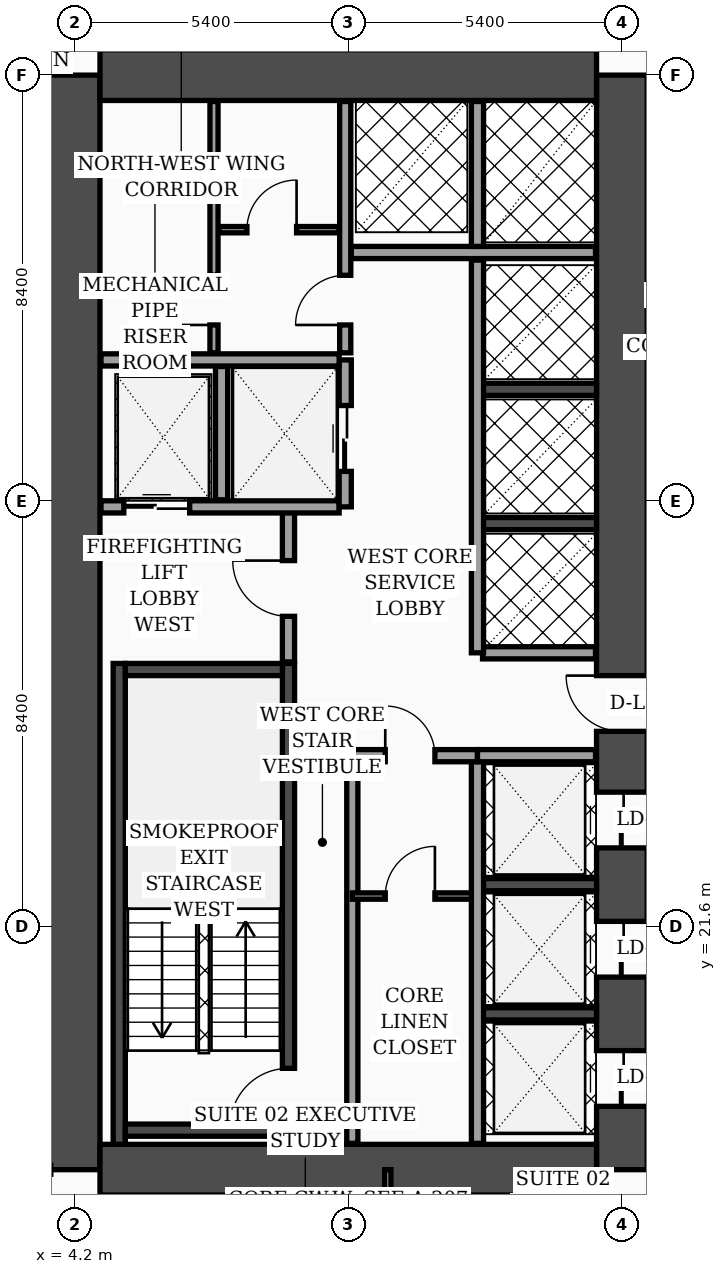
"""IFC4 building model, lengths in metres.
Left out: names, types, materials, properties, quantities, classifications, styles, units other than length and angle.
Written with IfcOpenShell. Run it as: python <this file> out.ifc"""

import sys

from ifc_helpers import new_model, si_unit, direction, frame, frame_2d, origin, place, context, subcontext, project, spatial, rectangle, extrude, element, fill, save


model = new_model("IFC4")
c1 = context("Model", 3, precision=1e-05, world=origin(), true_north=direction((0.0, 1.0)))
c2 = subcontext(c1, "Body", "Model", "MODEL_VIEW")
j1 = project(units=[si_unit("LENGTHUNIT", "METRE"), si_unit("PLANEANGLEUNIT", "RADIAN")], contexts=[c1])
p1 = place(None, origin())
s1 = spatial("IfcSite", under=j1, at=p1, CompositionType="ELEMENT")
p2 = place(p1, origin())
s2 = spatial("IfcBuilding", under=s1, at=p2, CompositionType="ELEMENT")
p3 = place(p2, frame((0.0, 0.0, 27.0)))
s3 = spatial("IfcBuildingStorey", under=s2, at=p3, CompositionType="ELEMENT", Elevation=27.0)
p4 = place(p3, frame((4.2, 16.8, 0.0), z_axis=(0.0, 0.0, 1.0), x_axis=(0.0, 1.0, 0.0)))
e1 = element("IfcWall", 1, at=p4, inside=s3, PredefinedType="SHEAR", context=c2, shape_type="SweptSolid", body=[
    extrude(rectangle(XDim=21.6, YDim=1.0, at=frame_2d((10.8, 0.0))), origin(), (0.0, 0.0, 1.0), 3.56),
])
p5 = place(p3, frame((15.0, 16.8, 0.0), z_axis=(0.0, 0.0, 1.0), x_axis=(0.0, 1.0, 0.0)))
e2 = element("IfcWall", 2, at=p5, inside=s3, PredefinedType="SHEAR", context=c2, shape_type="SweptSolid", body=[
    extrude(rectangle(XDim=21.6, YDim=1.0, at=frame_2d((10.8, 0.0))), origin(), (0.0, 0.0, 1.0), 3.56),
])
p6 = place(p5, frame((8.65, 0.0, 0.0)))
e3 = element("IfcOpeningElement", 3, at=p6, cuts=e2, PredefinedType="OPENING", context=c2, shape_type="SweptSolid", body=[
    extrude(rectangle(XDim=1.1, YDim=2.2, at=frame_2d((0.55, 1.1))), frame((0.0, 0.51, 0.0), z_axis=(0.0, -1.0, 0.0), x_axis=(1.0, 0.0, 0.0)), (0.0, 0.0, 1.0), 1.02),
])
p7 = place(p5, frame((1.25, 0.0, 0.0)))
e4 = element("IfcOpeningElement", 4, at=p7, cuts=e2, PredefinedType="OPENING", context=c2, shape_type="SweptSolid", body=[
    extrude(rectangle(XDim=1.1, YDim=2.2, at=frame_2d((0.55, 1.1))), frame((0.0, 0.51, 0.0), z_axis=(0.0, -1.0, 0.0), x_axis=(1.0, 0.0, 0.0)), (0.0, 0.0, 1.0), 1.02),
])
p8 = place(p5, frame((3.8, 0.0, 0.0)))
e5 = element("IfcOpeningElement", 5, at=p8, cuts=e2, PredefinedType="OPENING", context=c2, shape_type="SweptSolid", body=[
    extrude(rectangle(XDim=1.1, YDim=2.2, at=frame_2d((0.55, 1.1))), frame((0.0, 0.51, 0.0), z_axis=(0.0, -1.0, 0.0), x_axis=(1.0, 0.0, 0.0)), (0.0, 0.0, 1.0), 1.02),
])
p9 = place(p5, frame((6.35, 0.0, 0.0)))
e6 = element("IfcOpeningElement", 6, at=p9, cuts=e2, PredefinedType="OPENING", context=c2, shape_type="SweptSolid", body=[
    extrude(rectangle(XDim=1.1, YDim=2.2, at=frame_2d((0.55, 1.1))), frame((0.0, 0.51, 0.0), z_axis=(0.0, -1.0, 0.0), x_axis=(1.0, 0.0, 0.0)), (0.0, 0.0, 1.0), 1.02),
])
for number, where, z_axis, x_axis in (
    (7, (4.7, 38.4, 0.0), (0.0, 0.0, 1.0), (1.0, 0.0, 0.0)),
    (8, (4.7, 16.8, 0.0), (0.0, 0.0, 1.0), (1.0, 0.0, 0.0)),
):
    element("IfcWall", number, at=place(p3, frame(where, z_axis=z_axis, x_axis=x_axis)), inside=s3, PredefinedType="SHEAR", context=c2, shape_type="SweptSolid", body=[
        extrude(rectangle(XDim=9.8, YDim=1.0, at=frame_2d((4.9, 0.0))), origin(), (0.0, 0.0, 1.0), 3.56),
    ])
p10 = place(p3, frame((5.08, 17.3, 0.0), z_axis=(0.0, 0.0, 1.0), x_axis=(0.0, 1.0, 0.0)))
e9 = element("IfcWall", 9, at=p10, inside=s3, PredefinedType="SOLIDWALL", context=c2, shape_type="SweptSolid", body=[
    extrude(rectangle(XDim=9.49, YDim=0.24, at=frame_2d((4.745, 0.0))), origin(), (0.0, 0.0, 1.0), 3.56),
])
p11 = place(p3, frame((8.42, 17.3, 0.0), z_axis=(0.0, 0.0, 1.0), x_axis=(0.0, 1.0, 0.0)))
e10 = element("IfcWall", 10, at=p11, inside=s3, PredefinedType="SOLIDWALL", context=c2, shape_type="SweptSolid", body=[
    extrude(rectangle(XDim=9.49, YDim=0.24, at=frame_2d((4.745, 0.0))), origin(), (0.0, 0.0, 1.0), 3.56),
])
p12 = place(p11, frame((0.35, 0.0, 0.0)))
e11 = element("IfcOpeningElement", 11, at=p12, cuts=e10, PredefinedType="OPENING", context=c2, shape_type="SweptSolid", body=[
    extrude(rectangle(XDim=1.15, YDim=2.2, at=frame_2d((0.575, 1.1))), frame((0.0, 0.13, 0.0), z_axis=(0.0, -1.0, 0.0), x_axis=(1.0, 0.0, 0.0)), (0.0, 0.0, 1.0), 0.26),
])
for number, where, z_axis, x_axis in (
    (12, (5.2, 17.58, 0.0), (0.0, 0.0, 1.0), (1.0, 0.0, 0.0)),
    (13, (5.2, 26.67, 0.0), (0.0, 0.0, 1.0), (1.0, 0.0, 0.0)),
):
    element("IfcWall", number, at=place(p3, frame(where, z_axis=z_axis, x_axis=x_axis)), inside=s3, PredefinedType="SOLIDWALL", context=c2, shape_type="SweptSolid", body=[
        extrude(rectangle(XDim=3.1, YDim=0.24, at=frame_2d((1.55, 0.0))), origin(), (0.0, 0.0, 1.0), 3.56),
    ])
for number, where, z_axis, x_axis in (
    (14, (12.18, 19.875, 0.0), (0.0, 0.0, 1.0), (1.0, 0.0, 0.0)),
    (15, (12.18, 22.425, 0.0), (0.0, 0.0, 1.0), (1.0, 0.0, 0.0)),
    (16, (12.18, 29.55, 0.0), (0.0, 0.0, 1.0), (1.0, 0.0, 0.0)),
    (17, (12.18, 32.2, 0.0), (0.0, 0.0, 1.0), (1.0, 0.0, 0.0)),
):
    element("IfcWall", number, at=place(p3, frame(where, z_axis=z_axis, x_axis=x_axis)), inside=s3, PredefinedType="SOLIDWALL", context=c2, shape_type="SweptSolid", body=[
        extrude(rectangle(XDim=2.32, YDim=0.24, at=frame_2d((1.16, 0.0))), origin(), (0.0, 0.0, 1.0), 3.56),
    ])
p13 = place(p3, frame((8.42, 26.82, 0.0), z_axis=(0.0, 0.0, 1.0), x_axis=(0.0, 1.0, 0.0)))
e18 = element("IfcWall", 18, at=p13, inside=s3, PredefinedType="SOLIDWALL", context=c2, shape_type="SweptSolid", body=[
    extrude(rectangle(XDim=3.0, YDim=0.24, at=frame_2d((1.5, 0.0))), origin(), (0.0, 0.0, 1.0), 3.56),
])
p14 = place(p13, frame((0.9, 0.0, 0.0)))
e19 = element("IfcOpeningElement", 19, at=p14, cuts=e18, PredefinedType="OPENING", context=c2, shape_type="SweptSolid", body=[
    extrude(rectangle(XDim=1.1, YDim=2.2, at=frame_2d((0.55, 1.1))), frame((0.0, 0.13, 0.0), z_axis=(0.0, -1.0, 0.0), x_axis=(1.0, 0.0, 0.0)), (0.0, 0.0, 1.0), 0.26),
])
p15 = place(p3, frame((4.72, 29.88, 0.0), z_axis=(0.0, 0.0, 1.0), x_axis=(1.0, 0.0, 0.0)))
e20 = element("IfcWall", 20, at=p15, inside=s3, PredefinedType="SOLIDWALL", context=c2, shape_type="SweptSolid", body=[
    extrude(rectangle(XDim=4.7, YDim=0.24, at=frame_2d((2.35, 0.0))), origin(), (0.0, 0.0, 1.0), 3.56),
])
p16 = place(p15, frame((0.45, 0.0, 0.0)))
e21 = element("IfcOpeningElement", 21, at=p16, cuts=e20, PredefinedType="OPENING", context=c2, shape_type="SweptSolid", body=[
    extrude(rectangle(XDim=1.3, YDim=2.35, at=frame_2d((0.65, 1.175))), frame((0.0, 0.13, 0.0), z_axis=(0.0, -1.0, 0.0), x_axis=(1.0, 0.0, 0.0)), (0.0, 0.0, 1.0), 0.26),
])
p17 = place(p3, frame((7.1, 30.02, 0.0), z_axis=(0.0, 0.0, 1.0), x_axis=(0.0, 1.0, 0.0)))
e22 = element("IfcWall", 22, at=p17, inside=s3, PredefinedType="SOLIDWALL", context=c2, shape_type="SweptSolid", body=[
    extrude(rectangle(XDim=2.63, YDim=0.24, at=frame_2d((1.315, 0.0))), origin(), (0.0, 0.0, 1.0), 3.56),
])
p18 = place(p3, frame((9.54, 29.88, 0.0), z_axis=(0.0, 0.0, 1.0), x_axis=(0.0, 1.0, 0.0)))
e23 = element("IfcWall", 23, at=p18, inside=s3, PredefinedType="SOLIDWALL", context=c2, shape_type="SweptSolid", body=[
    extrude(rectangle(XDim=2.9, YDim=0.24, at=frame_2d((1.45, 0.0))), origin(), (0.0, 0.0, 1.0), 3.56),
])
p19 = place(p18, frame((0.7, 0.0, 0.0)))
e24 = element("IfcOpeningElement", 24, at=p19, cuts=e23, PredefinedType="OPENING", context=c2, shape_type="SweptSolid", body=[
    extrude(rectangle(XDim=1.3, YDim=2.35, at=frame_2d((0.65, 1.175))), frame((0.0, 0.13, 0.0), z_axis=(0.0, -1.0, 0.0), x_axis=(1.0, 0.0, 0.0)), (0.0, 0.0, 1.0), 0.26),
])
p20 = place(p3, frame((4.72, 32.78, 0.0), z_axis=(0.0, 0.0, 1.0), x_axis=(1.0, 0.0, 0.0)))
e25 = element("IfcWall", 25, at=p20, inside=s3, PredefinedType="SOLIDWALL", context=c2, shape_type="SweptSolid", body=[
    extrude(rectangle(XDim=4.7, YDim=0.24, at=frame_2d((2.35, 0.0))), origin(), (0.0, 0.0, 1.0), 3.56),
])
p21 = place(p3, frame((9.68, 17.32, 0.0), z_axis=(0.0, 0.0, 1.0), x_axis=(0.0, 1.0, 0.0)))
e26 = element("IfcWall", 26, at=p21, inside=s3, PredefinedType="SOLIDWALL", context=c2, shape_type="SweptSolid", body=[
    extrude(rectangle(XDim=7.68, YDim=0.22, at=frame_2d((3.84, 0.0))), origin(), (0.0, 0.0, 1.0), 3.56),
])
p22 = place(p3, frame((6.95, 32.92, 0.0), z_axis=(0.0, 0.0, 1.0), x_axis=(0.0, 1.0, 0.0)))
e27 = element("IfcWall", 27, at=p22, inside=s3, PredefinedType="PARTITIONING", context=c2, shape_type="SweptSolid", body=[
    extrude(rectangle(XDim=4.96, YDim=0.16, at=frame_2d((2.48, 0.0))), origin(), (0.0, 0.0, 1.0), 3.56),
])
p23 = place(p22, frame((0.55, 0.0, 0.0)))
e28 = element("IfcOpeningElement", 28, at=p23, cuts=e27, PredefinedType="OPENING", context=c2, shape_type="SweptSolid", body=[
    extrude(rectangle(XDim=0.98, YDim=2.15, at=frame_2d((0.49, 1.075))), frame((0.0, 0.09, 0.0), z_axis=(0.0, -1.0, 0.0), x_axis=(1.0, 0.0, 0.0)), (0.0, 0.0, 1.0), 0.18),
])
p24 = place(p3, frame((7.05, 35.35, 0.0), z_axis=(0.0, 0.0, 1.0), x_axis=(1.0, 0.0, 0.0)))
e29 = element("IfcWall", 29, at=p24, inside=s3, PredefinedType="PARTITIONING", context=c2, shape_type="SweptSolid", body=[
    extrude(rectangle(XDim=2.37, YDim=0.125, at=frame_2d((1.185, 0.0))), origin(), (0.0, 0.0, 1.0), 3.56),
])
p25 = place(p24, frame((0.55, 0.0, 0.0)))
e30 = element("IfcOpeningElement", 30, at=p25, cuts=e29, PredefinedType="OPENING", context=c2, shape_type="SweptSolid", body=[
    extrude(rectangle(XDim=0.98, YDim=2.15, at=frame_2d((0.49, 1.075))), frame((0.0, 0.073, 0.0), z_axis=(0.0, -1.0, 0.0), x_axis=(1.0, 0.0, 0.0)), (0.0, 0.0, 1.0), 0.145),
])
p26 = place(p3, frame((9.54, 32.92, 0.0), z_axis=(0.0, 0.0, 1.0), x_axis=(0.0, 1.0, 0.0)))
e31 = element("IfcWall", 31, at=p26, inside=s3, PredefinedType="SOLIDWALL", context=c2, shape_type="SweptSolid", body=[
    extrude(rectangle(XDim=4.96, YDim=0.22, at=frame_2d((2.48, 0.0))), origin(), (0.0, 0.0, 1.0), 3.56),
])
p27 = place(p26, frame((0.55, 0.0, 0.0)))
e32 = element("IfcOpeningElement", 32, at=p27, cuts=e31, PredefinedType="OPENING", context=c2, shape_type="SweptSolid", body=[
    extrude(rectangle(XDim=0.98, YDim=2.15, at=frame_2d((0.49, 1.075))), frame((0.0, 0.12, 0.0), z_axis=(0.0, -1.0, 0.0), x_axis=(1.0, 0.0, 0.0)), (0.0, 0.0, 1.0), 0.24),
])
p28 = place(p3, frame((9.68, 22.2, 0.0), z_axis=(0.0, 0.0, 1.0), x_axis=(1.0, 0.0, 0.0)))
e33 = element("IfcWall", 33, at=p28, inside=s3, PredefinedType="PARTITIONING", context=c2, shape_type="SweptSolid", body=[
    extrude(rectangle(XDim=2.47, YDim=0.125, at=frame_2d((1.235, 0.0))), origin(), (0.0, 0.0, 1.0), 3.56),
])
p29 = place(p28, frame((0.65, 0.0, 0.0)))
e34 = element("IfcOpeningElement", 34, at=p29, cuts=e33, PredefinedType="OPENING", context=c2, shape_type="SweptSolid", body=[
    extrude(rectangle(XDim=0.98, YDim=2.15, at=frame_2d((0.49, 1.075))), frame((0.0, 0.073, 0.0), z_axis=(0.0, -1.0, 0.0), x_axis=(1.0, 0.0, 0.0)), (0.0, 0.0, 1.0), 0.145),
])
p30 = place(p3, frame((12.15, 17.32, 0.0), z_axis=(0.0, 0.0, 1.0), x_axis=(0.0, 1.0, 0.0)))
e35 = element("IfcWall", 35, at=p30, inside=s3, PredefinedType="SOLIDWALL", context=c2, shape_type="SweptSolid", body=[
    extrude(rectangle(XDim=7.65, YDim=0.24, at=frame_2d((3.825, 0.0))), origin(), (0.0, 0.0, 1.0), 3.56),
])
p31 = place(p3, frame((9.68, 24.97, 0.0), z_axis=(0.0, 0.0, 1.0), x_axis=(1.0, 0.0, 0.0)))
e36 = element("IfcWall", 36, at=p31, inside=s3, PredefinedType="SOLIDWALL", context=c2, shape_type="SweptSolid", body=[
    extrude(rectangle(XDim=2.47, YDim=0.24, at=frame_2d((1.235, 0.0))), origin(), (0.0, 0.0, 1.0), 3.56),
])
p32 = place(p31, frame((0.65, 0.0, 0.0)))
e37 = element("IfcOpeningElement", 37, at=p32, cuts=e36, PredefinedType="OPENING", context=c2, shape_type="SweptSolid", body=[
    extrude(rectangle(XDim=0.98, YDim=2.15, at=frame_2d((0.49, 1.075))), frame((0.0, 0.13, 0.0), z_axis=(0.0, -1.0, 0.0), x_axis=(1.0, 0.0, 0.0)), (0.0, 0.0, 1.0), 0.26),
])
p33 = place(p3, frame((12.15, 24.97, 0.0), z_axis=(0.0, 0.0, 1.0), x_axis=(1.0, 0.0, 0.0)))
e38 = element("IfcWall", 38, at=p33, inside=s3, PredefinedType="SOLIDWALL", context=c2, shape_type="SweptSolid", body=[
    extrude(rectangle(XDim=2.33, YDim=0.24, at=frame_2d((1.165, 0.0))), origin(), (0.0, 0.0, 1.0), 2.84),
])
p34 = place(p3, frame((12.25, 27.0, 0.0), z_axis=(0.0, 0.0, 1.0), x_axis=(1.0, 0.0, 0.0)))
e39 = element("IfcWall", 39, at=p34, inside=s3, PredefinedType="SOLIDWALL", context=c2, shape_type="SweptSolid", body=[
    extrude(rectangle(XDim=2.23, YDim=0.24, at=frame_2d((1.115, 0.0))), origin(), (0.0, 0.0, 1.0), 3.56),
])
p35 = place(p3, frame((12.15, 27.0, 0.0), z_axis=(0.0, 0.0, 1.0), x_axis=(0.0, 1.0, 0.0)))
e40 = element("IfcWall", 40, at=p35, inside=s3, PredefinedType="SOLIDWALL", context=c2, shape_type="SweptSolid", body=[
    extrude(rectangle(XDim=7.75, YDim=0.24, at=frame_2d((3.875, 0.0))), origin(), (0.0, 0.0, 1.0), 3.56),
])
p36 = place(p3, frame((9.66, 34.9, 0.0), z_axis=(0.0, 0.0, 1.0), x_axis=(1.0, 0.0, 0.0)))
e41 = element("IfcWall", 41, at=p36, inside=s3, PredefinedType="SOLIDWALL", context=c2, shape_type="SweptSolid", body=[
    extrude(rectangle(XDim=4.82, YDim=0.24, at=frame_2d((2.41, 0.0))), origin(), (0.0, 0.0, 1.0), 3.56),
])
p37 = place(p3, frame((12.15, 35.02, 0.0), z_axis=(0.0, 0.0, 1.0), x_axis=(0.0, 1.0, 0.0)))
e42 = element("IfcWall", 42, at=p37, inside=s3, PredefinedType="SOLIDWALL", context=c2, shape_type="SweptSolid", body=[
    extrude(rectangle(XDim=2.86, YDim=0.24, at=frame_2d((1.43, 0.0))), origin(), (0.0, 0.0, 1.0), 3.56),
])
p38 = place(p3, frame((10.38, 14.67, 0.0), z_axis=(0.0, 0.0, 1.0), x_axis=(0.0, 1.0, 0.0)))
e43 = element("IfcWall", 43, at=p38, inside=s3, PredefinedType="PARTITIONING", context=c2, shape_type="SweptSolid", body=[
    extrude(rectangle(XDim=2.13, YDim=0.125, at=frame_2d((1.065, 0.0))), origin(), (0.0, 0.0, 1.0), 3.56),
])
p39 = place(p3, frame((13.3, 2.44, 0.0), z_axis=(0.0, 0.0, 1.0), x_axis=(0.0, 1.0, 0.0)))
e44 = element("IfcWall", 44, at=p39, inside=s3, PredefinedType="PARTITIONING", context=c2, shape_type="SweptSolid", body=[
    extrude(rectangle(XDim=14.36, YDim=0.18, at=frame_2d((7.18, 0.0))), origin(), (0.0, 0.0, 1.0), 3.04),
])
p40 = place(p39, frame((3.01, 0.0, 0.0)))
e45 = element("IfcOpeningElement", 45, at=p40, cuts=e44, PredefinedType="OPENING", context=c2, shape_type="SweptSolid", body=[
    extrude(rectangle(XDim=1.02, YDim=2.2, at=frame_2d((0.51, 1.1))), frame((0.0, 0.1, 0.0), z_axis=(0.0, -1.0, 0.0), x_axis=(1.0, 0.0, 0.0)), (0.0, 0.0, 1.0), 0.2),
])
p41 = place(p39, frame((8.94, 0.0, 0.0)))
e46 = element("IfcOpeningElement", 46, at=p41, cuts=e44, PredefinedType="OPENING", context=c2, shape_type="SweptSolid", body=[
    extrude(rectangle(XDim=1.02, YDim=2.2, at=frame_2d((0.51, 1.1))), frame((0.0, 0.1, 0.0), z_axis=(0.0, -1.0, 0.0), x_axis=(1.0, 0.0, 0.0)), (0.0, 0.0, 1.0), 0.2),
])
p42 = place(p14, origin())
e47 = element("IfcDoor", 47, at=p42, inside=s3, OperationType="SINGLE_SWING_RIGHT", PredefinedType="DOOR", context=c2, shape_type="SweptSolid", body=[
    extrude(rectangle(XDim=1.1, YDim=2.2, at=frame_2d((0.55, 1.1))), frame((0.0, 0.025, 0.0), z_axis=(0.0, -1.0, 0.0), x_axis=(1.0, 0.0, 0.0)), (0.0, 0.0, 1.0), 0.05),
])
fill(e19, e47)
p43 = place(p16, origin())
e48 = element("IfcDoor", 48, at=p43, inside=s3, OperationType="DOUBLE_DOOR_SLIDING", PredefinedType="DOOR", context=c2, shape_type="SweptSolid", body=[
    extrude(rectangle(XDim=1.3, YDim=2.35, at=frame_2d((0.65, 1.175))), frame((0.0, 0.025, 0.0), z_axis=(0.0, -1.0, 0.0), x_axis=(1.0, 0.0, 0.0)), (0.0, 0.0, 1.0), 0.05),
])
fill(e21, e48)
p44 = place(p19, origin())
e49 = element("IfcDoor", 49, at=p44, inside=s3, OperationType="DOUBLE_DOOR_SLIDING", PredefinedType="DOOR", context=c2, shape_type="SweptSolid", body=[
    extrude(rectangle(XDim=1.3, YDim=2.35, at=frame_2d((0.65, 1.175))), frame((0.0, 0.025, 0.0), z_axis=(0.0, -1.0, 0.0), x_axis=(1.0, 0.0, 0.0)), (0.0, 0.0, 1.0), 0.05),
])
fill(e24, e49)
p45 = place(p23, origin())
e50 = element("IfcDoor", 50, at=p45, inside=s3, OperationType="SINGLE_SWING_LEFT", PredefinedType="DOOR", context=c2, shape_type="SweptSolid", body=[
    extrude(rectangle(XDim=0.98, YDim=2.15, at=frame_2d((0.49, 1.075))), frame((0.0, 0.025, 0.0), z_axis=(0.0, -1.0, 0.0), x_axis=(1.0, 0.0, 0.0)), (0.0, 0.0, 1.0), 0.05),
])
fill(e28, e50)
p46 = place(p25, origin())
e51 = element("IfcDoor", 51, at=p46, inside=s3, OperationType="SINGLE_SWING_RIGHT", PredefinedType="DOOR", context=c2, shape_type="SweptSolid", body=[
    extrude(rectangle(XDim=0.98, YDim=2.15, at=frame_2d((0.49, 1.075))), frame((0.0, 0.025, 0.0), z_axis=(0.0, -1.0, 0.0), x_axis=(1.0, 0.0, 0.0)), (0.0, 0.0, 1.0), 0.05),
])
fill(e30, e51)
p47 = place(p27, origin())
e52 = element("IfcDoor", 52, at=p47, inside=s3, OperationType="SINGLE_SWING_LEFT", PredefinedType="DOOR", context=c2, shape_type="SweptSolid", body=[
    extrude(rectangle(XDim=0.98, YDim=2.15, at=frame_2d((0.49, 1.075))), frame((0.0, 0.025, 0.0), z_axis=(0.0, -1.0, 0.0), x_axis=(1.0, 0.0, 0.0)), (0.0, 0.0, 1.0), 0.05),
])
fill(e32, e52)
p48 = place(p29, origin())
e53 = element("IfcDoor", 53, at=p48, inside=s3, OperationType="SINGLE_SWING_RIGHT", PredefinedType="DOOR", context=c2, shape_type="SweptSolid", body=[
    extrude(rectangle(XDim=0.98, YDim=2.15, at=frame_2d((0.49, 1.075))), frame((0.0, 0.025, 0.0), z_axis=(0.0, -1.0, 0.0), x_axis=(1.0, 0.0, 0.0)), (0.0, 0.0, 1.0), 0.05),
])
fill(e34, e53)
p49 = place(p32, origin())
e54 = element("IfcDoor", 54, at=p49, inside=s3, OperationType="SINGLE_SWING_LEFT", PredefinedType="DOOR", context=c2, shape_type="SweptSolid", body=[
    extrude(rectangle(XDim=0.98, YDim=2.15, at=frame_2d((0.49, 1.075))), frame((0.0, 0.025, 0.0), z_axis=(0.0, -1.0, 0.0), x_axis=(1.0, 0.0, 0.0)), (0.0, 0.0, 1.0), 0.05),
])
fill(e37, e54)
p50 = place(p12, origin())
e55 = element("IfcDoor", 55, at=p50, inside=s3, OperationType="SINGLE_SWING_LEFT", PredefinedType="DOOR", context=c2, shape_type="SweptSolid", body=[
    extrude(rectangle(XDim=1.15, YDim=2.2, at=frame_2d((0.575, 1.1))), frame((0.0, 0.025, 0.0), z_axis=(0.0, -1.0, 0.0), x_axis=(1.0, 0.0, 0.0)), (0.0, 0.0, 1.0), 0.05),
])
fill(e11, e55)
p51 = place(p6, origin())
e56 = element("IfcDoor", 56, at=p51, inside=s3, OperationType="SINGLE_SWING_RIGHT", PredefinedType="DOOR", context=c2, shape_type="SweptSolid", body=[
    extrude(rectangle(XDim=1.1, YDim=2.2, at=frame_2d((0.55, 1.1))), frame((0.0, 0.025, 0.0), z_axis=(0.0, -1.0, 0.0), x_axis=(1.0, 0.0, 0.0)), (0.0, 0.0, 1.0), 0.05),
])
fill(e3, e56)
p52 = place(p7, origin())
e57 = element("IfcDoor", 57, at=p52, inside=s3, OperationType="DOUBLE_DOOR_SLIDING", PredefinedType="DOOR", context=c2, shape_type="SweptSolid", body=[
    extrude(rectangle(XDim=1.1, YDim=2.2, at=frame_2d((0.55, 1.1))), frame((0.0, 0.025, 0.0), z_axis=(0.0, -1.0, 0.0), x_axis=(1.0, 0.0, 0.0)), (0.0, 0.0, 1.0), 0.05),
])
fill(e4, e57)
p53 = place(p8, origin())
e58 = element("IfcDoor", 58, at=p53, inside=s3, OperationType="DOUBLE_DOOR_SLIDING", PredefinedType="DOOR", context=c2, shape_type="SweptSolid", body=[
    extrude(rectangle(XDim=1.1, YDim=2.2, at=frame_2d((0.55, 1.1))), frame((0.0, 0.025, 0.0), z_axis=(0.0, -1.0, 0.0), x_axis=(1.0, 0.0, 0.0)), (0.0, 0.0, 1.0), 0.05),
])
fill(e5, e58)
p54 = place(p9, origin())
e59 = element("IfcDoor", 59, at=p54, inside=s3, OperationType="DOUBLE_DOOR_SLIDING", PredefinedType="DOOR", context=c2, shape_type="SweptSolid", body=[
    extrude(rectangle(XDim=1.1, YDim=2.2, at=frame_2d((0.55, 1.1))), frame((0.0, 0.025, 0.0), z_axis=(0.0, -1.0, 0.0), x_axis=(1.0, 0.0, 0.0)), (0.0, 0.0, 1.0), 0.05),
])
fill(e6, e59)
save(model, sys.argv[1])
